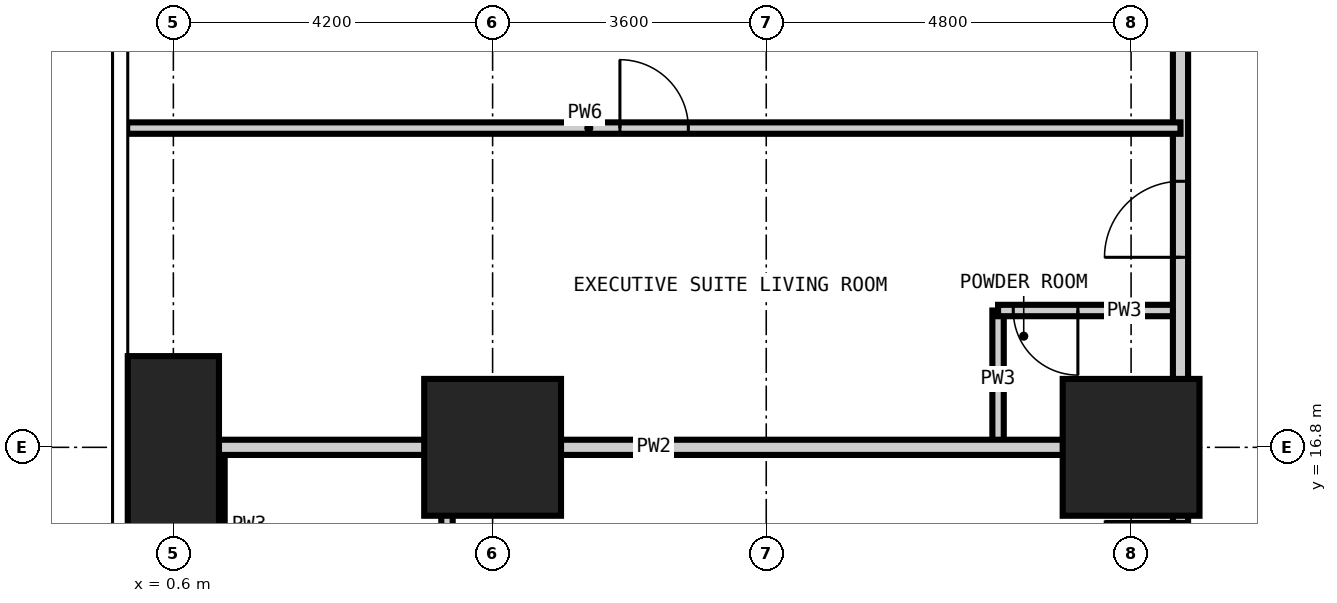
"""IFC4 building model, lengths in metres.
Left out: names, types, materials, properties, quantities, classifications, styles, units other than length and angle.
Written with IfcOpenShell. Run it as: python <this file> out.ifc"""

import sys

from ifc_helpers import new_model, si_unit, direction, frame, frame_2d, origin, origin_2d, place, context, subcontext, project, spatial, rectangle, extrude, element, fill, save


model = new_model("IFC4")
c1 = context("Model", 3, precision=1e-05, world=origin(), true_north=direction((0.0, 1.0)))
c2 = subcontext(c1, "Body", "Model", "MODEL_VIEW")
j1 = project(units=[si_unit("LENGTHUNIT", "METRE"), si_unit("PLANEANGLEUNIT", "RADIAN")], contexts=[c1])
p1 = place(None, origin())
s1 = spatial("IfcSite", under=j1, at=p1, CompositionType="ELEMENT")
p2 = place(p1, origin())
s2 = spatial("IfcBuilding", under=s1, at=p2, CompositionType="ELEMENT")
p3 = place(p2, frame((0.0, 0.0, 55.8)))
s3 = spatial("IfcBuildingStorey", under=s2, at=p3, CompositionType="ELEMENT", Elevation=55.8)
p4 = place(p3, frame((0.6, 16.8, -0.35), z_axis=(0.0, 0.0, 1.0), x_axis=(1.0, 0.0, 0.0)))
e1 = element("IfcColumn", 1, at=p4, inside=s3, PredefinedType="COLUMN", context=c2, shape_type="SweptSolid", body=[
    extrude(rectangle(XDim=1.2, YDim=2.4, at=origin_2d()), origin(), (0.0, 0.0, 1.0), 3.6),
])
for number, where, z_axis, x_axis in (
    (2, (4.8, 16.8, -0.35), (0.0, 0.0, 1.0), (1.0, 0.0, 0.0)),
    (3, (13.2, 16.8, -0.35), (0.0, 0.0, 1.0), (1.0, 0.0, 0.0)),
):
    element("IfcColumn", number, at=place(p3, frame(where, z_axis=z_axis, x_axis=x_axis)), inside=s3, PredefinedType="COLUMN", context=c2, shape_type="SweptSolid", body=[
        extrude(rectangle(XDim=1.8, YDim=1.8, at=origin_2d()), origin(), (0.0, 0.0, 1.0), 3.6),
    ])
p5 = place(p3, frame((1.2, 13.2, 0.0), z_axis=(0.0, 0.0, 1.0), x_axis=(0.0, 1.0, 0.0)))
e4 = element("IfcWall", 4, at=p5, inside=s3, PredefinedType="PARTITIONING", context=c2, shape_type="SweptSolid", body=[
    extrude(rectangle(XDim=3.6, YDim=0.15, at=frame_2d((1.8, 0.0))), origin(), (0.0, 0.0, 1.0), 3.25),
])
p6 = place(p5, frame((1.375, 0.0, 0.0)))
e5 = element("IfcOpeningElement", 5, at=p6, cuts=e4, PredefinedType="OPENING", context=c2, shape_type="SweptSolid", body=[
    extrude(rectangle(XDim=0.85, YDim=2.1, at=frame_2d((0.425, 1.05))), frame((0.0, 0.085, 0.0), z_axis=(0.0, -1.0, 0.0), x_axis=(1.0, 0.0, 0.0)), (0.0, 0.0, 1.0), 0.17),
])
p7 = place(p3, frame((11.45, 16.8, 0.0), z_axis=(0.0, 0.0, 1.0), x_axis=(0.0, 1.0, 0.0)))
e6 = element("IfcWall", 6, at=p7, inside=s3, PredefinedType="PARTITIONING", context=c2, shape_type="SweptSolid", body=[
    extrude(rectangle(XDim=1.8, YDim=0.15, at=frame_2d((0.9, 0.0))), origin(), (0.0, 0.0, 1.0), 3.25),
])
p8 = place(p3, frame((11.45, 18.6, 0.0), z_axis=(0.0, 0.0, 1.0), x_axis=(1.0, 0.0, 0.0)))
e7 = element("IfcWall", 7, at=p8, inside=s3, PredefinedType="PARTITIONING", context=c2, shape_type="SweptSolid", body=[
    extrude(rectangle(XDim=2.4, YDim=0.15, at=frame_2d((1.2, 0.0))), origin(), (0.0, 0.0, 1.0), 3.25),
])
p9 = place(p8, frame((0.2, 0.0, 0.0)))
e8 = element("IfcOpeningElement", 8, at=p9, cuts=e7, PredefinedType="OPENING", context=c2, shape_type="SweptSolid", body=[
    extrude(rectangle(XDim=0.85, YDim=2.1, at=frame_2d((0.425, 1.05))), frame((0.0, 0.085, 0.0), z_axis=(0.0, -1.0, 0.0), x_axis=(1.0, 0.0, 0.0)), (0.0, 0.0, 1.0), 0.17),
])
p10 = place(p3, frame((13.85, 13.85, 0.0), z_axis=(0.0, 0.0, 1.0), x_axis=(0.0, 1.0, 0.0)))
e9 = element("IfcWall", 9, at=p10, inside=s3, PredefinedType="PARTITIONING", context=c2, shape_type="SweptSolid", body=[
    extrude(rectangle(XDim=32.3, YDim=0.2, at=frame_2d((16.15, 0.0))), origin(), (0.0, 0.0, 1.0), 3.25),
])
p11 = place(p10, frame((5.45, 0.0, 0.0)))
e10 = element("IfcOpeningElement", 10, at=p11, cuts=e9, PredefinedType="OPENING", context=c2, shape_type="SweptSolid", body=[
    extrude(rectangle(XDim=1.0, YDim=2.2, at=frame_2d((0.5, 1.1))), frame((0.0, 0.11, 0.0), z_axis=(0.0, -1.0, 0.0), x_axis=(1.0, 0.0, 0.0)), (0.0, 0.0, 1.0), 0.22),
])
p12 = place(p10, frame((13.85, 0.0, 0.0)))
e11 = element("IfcOpeningElement", 11, at=p12, cuts=e9, PredefinedType="OPENING", context=c2, shape_type="SweptSolid", body=[
    extrude(rectangle(XDim=1.0, YDim=2.2, at=frame_2d((0.5, 1.1))), frame((0.0, 0.11, 0.0), z_axis=(0.0, -1.0, 0.0), x_axis=(1.0, 0.0, 0.0)), (0.0, 0.0, 1.0), 0.22),
])
p13 = place(p10, frame((22.25, 0.0, 0.0)))
e12 = element("IfcOpeningElement", 12, at=p13, cuts=e9, PredefinedType="OPENING", context=c2, shape_type="SweptSolid", body=[
    extrude(rectangle(XDim=1.0, YDim=2.2, at=frame_2d((0.5, 1.1))), frame((0.0, 0.11, 0.0), z_axis=(0.0, -1.0, 0.0), x_axis=(1.0, 0.0, 0.0)), (0.0, 0.0, 1.0), 0.22),
])
p14 = place(p10, frame((0.975, 0.0, 0.0)))
e13 = element("IfcOpeningElement", 13, at=p14, cuts=e9, PredefinedType="OPENING", context=c2, shape_type="SweptSolid", body=[
    extrude(rectangle(XDim=1.0, YDim=2.2, at=frame_2d((0.5, 1.1))), frame((0.0, 0.11, 0.0), z_axis=(0.0, -1.0, 0.0), x_axis=(1.0, 0.0, 0.0)), (0.0, 0.0, 1.0), 0.22),
])
p15 = place(p10, frame((29.725, 0.0, 0.0)))
e14 = element("IfcOpeningElement", 14, at=p15, cuts=e9, PredefinedType="OPENING", context=c2, shape_type="SweptSolid", body=[
    extrude(rectangle(XDim=1.0, YDim=2.2, at=frame_2d((0.5, 1.1))), frame((0.0, 0.11, 0.0), z_axis=(0.0, -1.0, 0.0), x_axis=(1.0, 0.0, 0.0)), (0.0, 0.0, 1.0), 0.22),
])
p16 = place(p3, frame((-0.008, 16.8, 0.0), z_axis=(0.0, 0.0, 1.0), x_axis=(1.0, 0.0, 0.0)))
e15 = element("IfcWall", 15, at=p16, inside=s3, PredefinedType="PARTITIONING", context=c2, shape_type="SweptSolid", body=[
    extrude(rectangle(XDim=13.858, YDim=0.2, at=frame_2d((6.929, 0.0))), origin(), (0.0, 0.0, 1.0), 3.25),
])
p17 = place(p3, frame((4.2, -0.008, 0.0), z_axis=(0.0, 0.0, 1.0), x_axis=(0.0, 1.0, 0.0)))
e16 = element("IfcWall", 16, at=p17, inside=s3, PredefinedType="PARTITIONING", context=c2, shape_type="SweptSolid", body=[
    extrude(rectangle(XDim=16.808, YDim=0.15, at=frame_2d((8.404, 0.0))), origin(), (0.0, 0.0, 1.0), 3.25),
])
p18 = place(p17, frame((4.958, 0.0, 0.0)))
e17 = element("IfcOpeningElement", 17, at=p18, cuts=e16, PredefinedType="OPENING", context=c2, shape_type="SweptSolid", body=[
    extrude(rectangle(XDim=0.9, YDim=2.1, at=frame_2d((0.45, 1.05))), frame((0.0, 0.085, 0.0), z_axis=(0.0, -1.0, 0.0), x_axis=(1.0, 0.0, 0.0)), (0.0, 0.0, 1.0), 0.17),
])
p19 = place(p3, frame((-0.008, 21.0, 0.0), z_axis=(0.0, 0.0, 1.0), x_axis=(1.0, 0.0, 0.0)))
e18 = element("IfcWall", 18, at=p19, inside=s3, PredefinedType="PARTITIONING", context=c2, shape_type="SweptSolid", body=[
    extrude(rectangle(XDim=13.858, YDim=0.15, at=frame_2d((6.929, 0.0))), origin(), (0.0, 0.0, 1.0), 3.25),
])
p20 = place(p19, frame((6.483, 0.0, 0.0)))
e19 = element("IfcOpeningElement", 19, at=p20, cuts=e18, PredefinedType="OPENING", context=c2, shape_type="SweptSolid", body=[
    extrude(rectangle(XDim=0.9, YDim=2.1, at=frame_2d((0.45, 1.05))), frame((0.0, 0.085, 0.0), z_axis=(0.0, -1.0, 0.0), x_axis=(1.0, 0.0, 0.0)), (0.0, 0.0, 1.0), 0.17),
])
p21 = place(p11, origin())
e20 = element("IfcDoor", 20, at=p21, inside=s3, OperationType="SINGLE_SWING_LEFT", PredefinedType="DOOR", context=c2, shape_type="SweptSolid", body=[
    extrude(rectangle(XDim=1.0, YDim=2.2, at=frame_2d((0.5, 1.1))), frame((0.0, 0.025, 0.0), z_axis=(0.0, -1.0, 0.0), x_axis=(1.0, 0.0, 0.0)), (0.0, 0.0, 1.0), 0.05),
])
fill(e10, e20)
p22 = place(p9, frame((0.85, 0.0, 0.0), z_axis=(0.0, 0.0, 1.0), x_axis=(-1.0, 0.0, 0.0)))
e21 = element("IfcDoor", 21, at=p22, inside=s3, OperationType="SINGLE_SWING_LEFT", PredefinedType="DOOR", context=c2, shape_type="SweptSolid", body=[
    extrude(rectangle(XDim=0.85, YDim=2.1, at=frame_2d((0.425, 1.05))), frame((0.0, 0.025, 0.0), z_axis=(0.0, -1.0, 0.0), x_axis=(1.0, 0.0, 0.0)), (0.0, 0.0, 1.0), 0.05),
])
fill(e8, e21)
p23 = place(p20, origin())
e22 = element("IfcDoor", 22, at=p23, inside=s3, OperationType="SINGLE_SWING_LEFT", PredefinedType="DOOR", context=c2, shape_type="SweptSolid", body=[
    extrude(rectangle(XDim=0.9, YDim=2.1, at=frame_2d((0.45, 1.05))), frame((0.0, 0.025, 0.0), z_axis=(0.0, -1.0, 0.0), x_axis=(1.0, 0.0, 0.0)), (0.0, 0.0, 1.0), 0.05),
])
fill(e19, e22)
p24 = place(p14, origin())
e23 = element("IfcDoor", 23, at=p24, inside=s3, OperationType="SINGLE_SWING_RIGHT", PredefinedType="DOOR", context=c2, shape_type="SweptSolid", body=[
    extrude(rectangle(XDim=1.0, YDim=2.2, at=frame_2d((0.5, 1.1))), frame((0.0, 0.025, 0.0), z_axis=(0.0, -1.0, 0.0), x_axis=(1.0, 0.0, 0.0)), (0.0, 0.0, 1.0), 0.05),
])
fill(e13, e23)
save(model, sys.argv[1])
